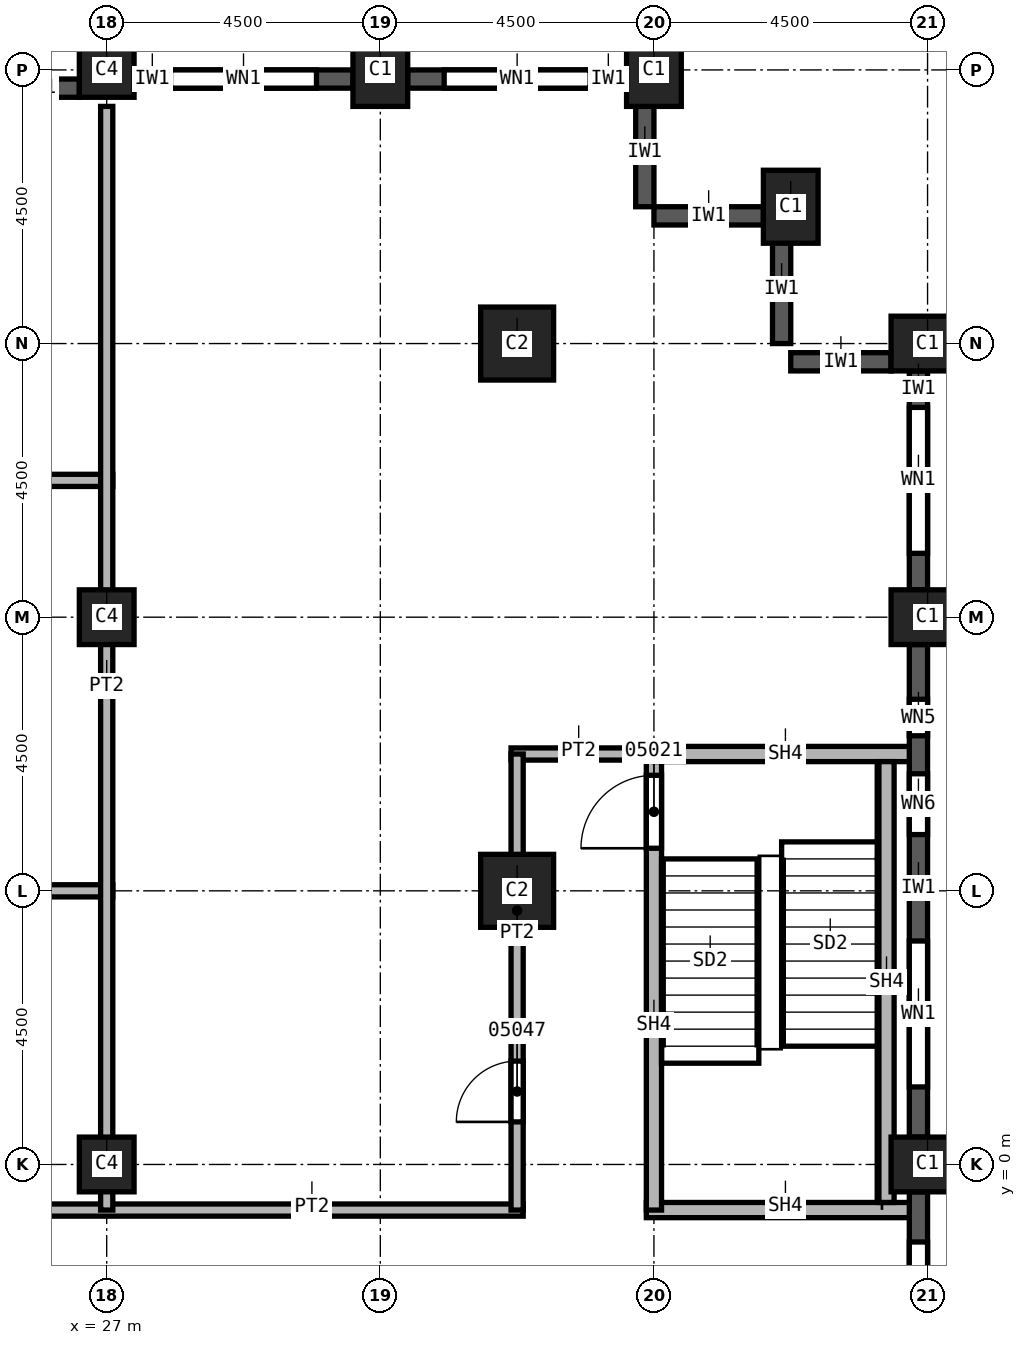
"""IFC4 building model, lengths in metres.
Left out: names, types, materials, properties, quantities, classifications, styles, units other than length and angle.
Written with IfcOpenShell. Run it as: python <this file> out.ifc"""

import sys

from ifc_helpers import new_model, si_unit, direction, frame, frame_2d, origin, origin_2d, place, context, subcontext, project, spatial, rectangle, extrude, element, fill, save


model = new_model("IFC4")
c1 = context("Model", 3, precision=1e-05, world=origin(), true_north=direction((0.0, 1.0)))
c2 = subcontext(c1, "Body", "Model", "MODEL_VIEW")
j1 = project(units=[si_unit("LENGTHUNIT", "METRE"), si_unit("PLANEANGLEUNIT", "RADIAN")], contexts=[c1])
p1 = place(None, origin())
s1 = spatial("IfcSite", under=j1, at=p1, CompositionType="ELEMENT")
p2 = place(p1, origin())
s2 = spatial("IfcBuilding", under=s1, at=p2, CompositionType="ELEMENT")
p3 = place(p2, frame((0.0, 0.0, 112.0)))
s3 = spatial("IfcBuildingStorey", under=s2, at=p3, CompositionType="ELEMENT", Elevation=112.0)
for number, where, z_axis, x_axis in (
    (1, (40.5, 0.0, 0.0), (0.0, 0.0, 1.0), (0.0, 1.0, 0.0)),
    (2, (40.5, 9.0, 0.0), (0.0, 0.0, 1.0), (0.0, 1.0, 0.0)),
    (3, (40.5, 13.5, 0.0), (0.0, 0.0, 1.0), (0.0, 1.0, 0.0)),
    (4, (38.25, 15.75, 0.0), (0.0, 0.0, 1.0), (1.0, 0.0, 0.0)),
    (5, (31.5, 18.0, 0.0), (0.0, 0.0, 1.0), (1.0, 0.0, 0.0)),
    (6, (36.0, 18.0, 0.0), (0.0, 0.0, 1.0), (1.0, 0.0, 0.0)),
):
    element("IfcColumn", number, at=place(p3, frame(where, z_axis=z_axis, x_axis=x_axis)), inside=s3, PredefinedType="COLUMN", context=c2, shape_type="SweptSolid", body=[
        extrude(rectangle(XDim=0.9, YDim=1.2, at=origin_2d()), origin(), (0.0, 0.0, 1.0), 3.7),
    ])
for number, where, z_axis, x_axis in (
    (7, (33.75, 4.5, 0.0), (0.0, 0.0, 1.0), (1.0, 0.0, 0.0)),
    (8, (33.75, 13.5, 0.0), (0.0, 0.0, 1.0), (1.0, 0.0, 0.0)),
):
    element("IfcColumn", number, at=place(p3, frame(where, z_axis=z_axis, x_axis=x_axis)), inside=s3, PredefinedType="COLUMN", context=c2, shape_type="SweptSolid", body=[
        extrude(rectangle(XDim=1.2, YDim=1.2, at=origin_2d()), origin(), (0.0, 0.0, 1.0), 3.7),
    ])
for number, where, z_axis, x_axis in (
    (9, (27.0, 0.0, 0.0), (0.0, 0.0, 1.0), (1.0, 0.0, 0.0)),
    (10, (27.0, 9.0, 0.0), (0.0, 0.0, 1.0), (1.0, 0.0, 0.0)),
    (11, (27.0, 18.0, 0.0), (0.0, 0.0, 1.0), (1.0, 0.0, 0.0)),
):
    element("IfcColumn", number, at=place(p3, frame(where, z_axis=z_axis, x_axis=x_axis)), inside=s3, PredefinedType="COLUMN", context=c2, shape_type="SweptSolid", body=[
        extrude(rectangle(XDim=0.9, YDim=0.9, at=origin_2d()), origin(), (0.0, 0.0, 1.0), 3.7),
    ])
p4 = place(p3, frame((39.9, 13.2, 0.0), z_axis=(0.0, 0.0, 1.0), x_axis=(-1.0, 0.0, 0.0)))
e12 = element("IfcWall", 12, at=p4, inside=s3, PredefinedType="SOLIDWALL", context=c2, shape_type="SweptSolid", body=[
    extrude(rectangle(XDim=1.65, YDim=0.3, at=frame_2d((0.825, 0.0))), origin(), (0.0, 0.0, 1.0), 3.1),
])
for number, where, z_axis, x_axis in (
    (13, (38.1, 15.3, 0.0), (0.0, 0.0, 1.0), (0.0, -1.0, 0.0)),
    (14, (37.8, 15.6, 0.0), (0.0, 0.0, 1.0), (-1.0, 0.0, 0.0)),
    (15, (35.85, 17.55, 0.0), (0.0, 0.0, 1.0), (0.0, -1.0, 0.0)),
):
    element("IfcWall", number, at=place(p3, frame(where, z_axis=z_axis, x_axis=x_axis)), inside=s3, PredefinedType="SOLIDWALL", context=c2, shape_type="SweptSolid", body=[
        extrude(rectangle(XDim=1.8, YDim=0.3, at=frame_2d((0.9, 0.0))), origin(), (0.0, 0.0, 1.0), 3.1),
    ])
p5 = place(p3, frame((40.35, -8.55, 0.0), z_axis=(0.0, 0.0, 1.0), x_axis=(0.0, 1.0, 0.0)))
e16 = element("IfcWall", 16, at=p5, inside=s3, PredefinedType="SOLIDWALL", context=c2, shape_type="SweptSolid", body=[
    extrude(rectangle(XDim=8.1, YDim=0.3, at=frame_2d((4.05, 0.0))), origin(), (0.0, 0.0, 1.0), 3.1),
])
p6 = place(p5, frame((0.825, 0.0, 0.8)))
e17 = element("IfcOpeningElement", 17, at=p6, cuts=e16, PredefinedType="OPENING", context=c2, shape_type="SweptSolid", body=[
    extrude(rectangle(XDim=2.4, YDim=1.95, at=frame_2d((1.2, 0.975))), frame((0.0, 0.15, 0.0), z_axis=(0.0, -1.0, 0.0), x_axis=(1.0, 0.0, 0.0)), (0.0, 0.0, 1.0), 0.3),
])
p7 = place(p5, frame((4.875, 0.0, 0.8)))
e18 = element("IfcOpeningElement", 18, at=p7, cuts=e16, PredefinedType="OPENING", context=c2, shape_type="SweptSolid", body=[
    extrude(rectangle(XDim=2.4, YDim=1.95, at=frame_2d((1.2, 0.975))), frame((0.0, 0.15, 0.0), z_axis=(0.0, -1.0, 0.0), x_axis=(1.0, 0.0, 0.0)), (0.0, 0.0, 1.0), 0.3),
])
p8 = place(p3, frame((40.35, 0.45, 0.0), z_axis=(0.0, 0.0, 1.0), x_axis=(0.0, 1.0, 0.0)))
e19 = element("IfcWall", 19, at=p8, inside=s3, PredefinedType="SOLIDWALL", context=c2, shape_type="SweptSolid", body=[
    extrude(rectangle(XDim=8.1, YDim=0.3, at=frame_2d((4.05, 0.0))), origin(), (0.0, 0.0, 1.0), 3.1),
])
p9 = place(p8, frame((0.825, 0.0, 0.8)))
e20 = element("IfcOpeningElement", 20, at=p9, cuts=e19, PredefinedType="OPENING", context=c2, shape_type="SweptSolid", body=[
    extrude(rectangle(XDim=2.4, YDim=1.95, at=frame_2d((1.2, 0.975))), frame((0.0, 0.15, 0.0), z_axis=(0.0, -1.0, 0.0), x_axis=(1.0, 0.0, 0.0)), (0.0, 0.0, 1.0), 0.3),
])
p10 = place(p8, frame((4.975, 0.0, 0.8)))
e21 = element("IfcOpeningElement", 21, at=p10, cuts=e19, PredefinedType="OPENING", context=c2, shape_type="SweptSolid", body=[
    extrude(rectangle(XDim=1.0, YDim=1.95, at=frame_2d((0.5, 0.975))), frame((0.0, 0.15, 0.0), z_axis=(0.0, -1.0, 0.0), x_axis=(1.0, 0.0, 0.0)), (0.0, 0.0, 1.0), 0.3),
])
p11 = place(p8, frame((6.6, 0.0, 0.8)))
e22 = element("IfcOpeningElement", 22, at=p11, cuts=e19, PredefinedType="OPENING", context=c2, shape_type="SweptSolid", body=[
    extrude(rectangle(XDim=0.6, YDim=1.95, at=frame_2d((0.3, 0.975))), frame((0.0, 0.15, 0.0), z_axis=(0.0, -1.0, 0.0), x_axis=(1.0, 0.0, 0.0)), (0.0, 0.0, 1.0), 0.3),
])
p12 = place(p3, frame((40.35, 9.45, 0.0), z_axis=(0.0, 0.0, 1.0), x_axis=(0.0, 1.0, 0.0)))
e23 = element("IfcWall", 23, at=p12, inside=s3, PredefinedType="SOLIDWALL", context=c2, shape_type="SweptSolid", body=[
    extrude(rectangle(XDim=3.6, YDim=0.3, at=frame_2d((1.8, 0.0))), origin(), (0.0, 0.0, 1.0), 3.1),
])
p13 = place(p12, frame((0.6, 0.0, 0.8)))
e24 = element("IfcOpeningElement", 24, at=p13, cuts=e23, PredefinedType="OPENING", context=c2, shape_type="SweptSolid", body=[
    extrude(rectangle(XDim=2.4, YDim=1.95, at=frame_2d((1.2, 0.975))), frame((0.0, 0.15, 0.0), z_axis=(0.0, -1.0, 0.0), x_axis=(1.0, 0.0, 0.0)), (0.0, 0.0, 1.0), 0.3),
])
p14 = place(p3, frame((35.55, 17.85, 0.0), z_axis=(0.0, 0.0, 1.0), x_axis=(-1.0, 0.0, 0.0)))
e25 = element("IfcWall", 25, at=p14, inside=s3, PredefinedType="SOLIDWALL", context=c2, shape_type="SweptSolid", body=[
    extrude(rectangle(XDim=3.6, YDim=0.3, at=frame_2d((1.8, 0.0))), origin(), (0.0, 0.0, 1.0), 3.1),
])
p15 = place(p14, frame((0.6, 0.0, 0.8)))
e26 = element("IfcOpeningElement", 26, at=p15, cuts=e25, PredefinedType="OPENING", context=c2, shape_type="SweptSolid", body=[
    extrude(rectangle(XDim=2.4, YDim=1.95, at=frame_2d((1.2, 0.975))), frame((0.0, 0.15, 0.0), z_axis=(0.0, -1.0, 0.0), x_axis=(1.0, 0.0, 0.0)), (0.0, 0.0, 1.0), 0.3),
])
p16 = place(p3, frame((31.05, 17.85, 0.0), z_axis=(0.0, 0.0, 1.0), x_axis=(-1.0, 0.0, 0.0)))
e27 = element("IfcWall", 27, at=p16, inside=s3, PredefinedType="SOLIDWALL", context=c2, shape_type="SweptSolid", body=[
    extrude(rectangle(XDim=3.6, YDim=0.3, at=frame_2d((1.8, 0.0))), origin(), (0.0, 0.0, 1.0), 3.1),
])
p17 = place(p16, frame((0.6, 0.0, 0.8)))
e28 = element("IfcOpeningElement", 28, at=p17, cuts=e27, PredefinedType="OPENING", context=c2, shape_type="SweptSolid", body=[
    extrude(rectangle(XDim=2.4, YDim=1.95, at=frame_2d((1.2, 0.975))), frame((0.0, 0.15, 0.0), z_axis=(0.0, -1.0, 0.0), x_axis=(1.0, 0.0, 0.0)), (0.0, 0.0, 1.0), 0.3),
])
p18 = place(p3, frame((26.55, 17.7, 0.0), z_axis=(0.0, 0.0, 1.0), x_axis=(-1.0, 0.0, 0.0)))
e29 = element("IfcWall", 29, at=p18, inside=s3, PredefinedType="SOLIDWALL", context=c2, shape_type="SweptSolid", body=[
    extrude(rectangle(XDim=1.35, YDim=0.3, at=frame_2d((0.675, 0.0))), origin(), (0.0, 0.0, 1.0), 3.1),
])
p19 = place(p3, frame((19.9, -0.75, 0.0), z_axis=(0.0, 0.0, 1.0), x_axis=(1.0, 0.0, 0.0)))
e30 = element("IfcWall", 30, at=p19, inside=s3, PredefinedType="PARTITIONING", context=c2, shape_type="SweptSolid", body=[
    extrude(rectangle(XDim=13.95, YDim=0.2, at=frame_2d((6.975, 0.0))), origin(), (0.0, 0.0, 1.0), 3.7),
])
p20 = place(p19, frame((3.4, 0.0, 0.0)))
e31 = element("IfcOpeningElement", 31, at=p20, cuts=e30, PredefinedType="OPENING", context=c2, shape_type="SweptSolid", body=[
    extrude(rectangle(XDim=1.0, YDim=2.1, at=frame_2d((0.5, 1.05))), frame((0.0, 0.1, 0.0), z_axis=(0.0, -1.0, 0.0), x_axis=(1.0, 0.0, 0.0)), (0.0, 0.0, 1.0), 0.2),
])
for number, where, z_axis, x_axis in (
    (32, (19.9, 4.5, 0.0), (0.0, 0.0, 1.0), (1.0, 0.0, 0.0)),
    (33, (19.9, 11.25, 0.0), (0.0, 0.0, 1.0), (1.0, 0.0, 0.0)),
):
    element("IfcWall", number, at=place(p3, frame(where, z_axis=z_axis, x_axis=x_axis)), inside=s3, PredefinedType="PARTITIONING", context=c2, shape_type="SweptSolid", body=[
        extrude(rectangle(XDim=7.2, YDim=0.2, at=frame_2d((3.6, 0.0))), origin(), (0.0, 0.0, 1.0), 3.7),
    ])
p21 = place(p3, frame((27.0, 17.4, 0.0), z_axis=(0.0, 0.0, 1.0), x_axis=(0.0, -1.0, 0.0)))
e34 = element("IfcWall", 34, at=p21, inside=s3, PredefinedType="PARTITIONING", context=c2, shape_type="SweptSolid", body=[
    extrude(rectangle(XDim=18.15, YDim=0.2, at=frame_2d((9.075, 0.0))), origin(), (0.0, 0.0, 1.0), 3.7),
])
p22 = place(p3, frame((33.65, 6.75, 0.0), z_axis=(0.0, 0.0, 1.0), x_axis=(1.0, 0.0, 0.0)))
e35 = element("IfcWall", 35, at=p22, inside=s3, PredefinedType="PARTITIONING", context=c2, shape_type="SweptSolid", body=[
    extrude(rectangle(XDim=2.35, YDim=0.2, at=frame_2d((1.175, 0.0))), origin(), (0.0, 0.0, 1.0), 3.7),
])
p23 = place(p3, frame((33.75, -0.75, 0.0), z_axis=(0.0, 0.0, 1.0), x_axis=(0.0, 1.0, 0.0)))
e36 = element("IfcWall", 36, at=p23, inside=s3, PredefinedType="PARTITIONING", context=c2, shape_type="SweptSolid", body=[
    extrude(rectangle(XDim=7.5, YDim=0.2, at=frame_2d((3.75, 0.0))), origin(), (0.0, 0.0, 1.0), 3.7),
])
p24 = place(p23, frame((1.45, 0.0, 0.0)))
e37 = element("IfcOpeningElement", 37, at=p24, cuts=e36, PredefinedType="OPENING", context=c2, shape_type="SweptSolid", body=[
    extrude(rectangle(XDim=1.0, YDim=2.1, at=frame_2d((0.5, 1.05))), frame((0.0, 0.1, 0.0), z_axis=(0.0, -1.0, 0.0), x_axis=(1.0, 0.0, 0.0)), (0.0, 0.0, 1.0), 0.2),
])
p25 = place(p3, frame((35.875, -0.75, 0.0), z_axis=(0.0, 0.0, 1.0), x_axis=(1.0, 0.0, 0.0)))
e38 = element("IfcWall", 38, at=p25, inside=s3, PredefinedType="SOLIDWALL", context=c2, shape_type="SweptSolid", body=[
    extrude(rectangle(XDim=4.325, YDim=0.25, at=frame_2d((2.163, 0.0))), origin(), (0.0, 0.0, 1.0), 3.7),
])
p26 = place(p3, frame((36.0, -0.75, 0.0), z_axis=(0.0, 0.0, 1.0), x_axis=(0.0, 1.0, 0.0)))
e39 = element("IfcWall", 39, at=p26, inside=s3, PredefinedType="SOLIDWALL", context=c2, shape_type="SweptSolid", body=[
    extrude(rectangle(XDim=7.625, YDim=0.25, at=frame_2d((3.812, 0.0))), origin(), (0.0, 0.0, 1.0), 3.7),
])
p27 = place(p26, frame((5.95, 0.0, 0.0)))
e40 = element("IfcOpeningElement", 40, at=p27, cuts=e39, PredefinedType="OPENING", context=c2, shape_type="SweptSolid", body=[
    extrude(rectangle(XDim=1.2, YDim=2.1, at=frame_2d((0.6, 1.05))), frame((0.0, 0.125, 0.0), z_axis=(0.0, -1.0, 0.0), x_axis=(1.0, 0.0, 0.0)), (0.0, 0.0, 1.0), 0.25),
])
p28 = place(p3, frame((36.0, 6.75, 0.0), z_axis=(0.0, 0.0, 1.0), x_axis=(1.0, 0.0, 0.0)))
e41 = element("IfcWall", 41, at=p28, inside=s3, PredefinedType="SOLIDWALL", context=c2, shape_type="SweptSolid", body=[
    extrude(rectangle(XDim=4.2, YDim=0.25, at=frame_2d((2.1, 0.0))), origin(), (0.0, 0.0, 1.0), 3.7),
])
p29 = place(p3, frame((39.825, -0.625, 0.0), z_axis=(0.0, 0.0, 1.0), x_axis=(0.0, 1.0, 0.0)))
e42 = element("IfcWall", 42, at=p29, inside=s3, PredefinedType="SOLIDWALL", context=c2, shape_type="SweptSolid", body=[
    extrude(rectangle(XDim=7.25, YDim=0.25, at=frame_2d((3.625, 0.0))), origin(), (0.0, 0.0, 1.0), 3.7),
])
p30 = place(p7, origin())
e43 = element("IfcWindow", 43, at=p30, inside=s3, PartitioningType="SINGLE_PANEL", PredefinedType="WINDOW", context=c2, shape_type="SweptSolid", body=[
    extrude(rectangle(XDim=2.4, YDim=1.95, at=frame_2d((1.2, 0.975))), frame((0.0, 0.03, 0.0), z_axis=(0.0, -1.0, 0.0), x_axis=(1.0, 0.0, 0.0)), (0.0, 0.0, 1.0), 0.06),
])
fill(e18, e43)
p31 = place(p9, origin())
e44 = element("IfcWindow", 44, at=p31, inside=s3, PartitioningType="SINGLE_PANEL", PredefinedType="WINDOW", context=c2, shape_type="SweptSolid", body=[
    extrude(rectangle(XDim=2.4, YDim=1.95, at=frame_2d((1.2, 0.975))), frame((0.0, 0.03, 0.0), z_axis=(0.0, -1.0, 0.0), x_axis=(1.0, 0.0, 0.0)), (0.0, 0.0, 1.0), 0.06),
])
fill(e20, e44)
p32 = place(p13, origin())
e45 = element("IfcWindow", 45, at=p32, inside=s3, PartitioningType="SINGLE_PANEL", PredefinedType="WINDOW", context=c2, shape_type="SweptSolid", body=[
    extrude(rectangle(XDim=2.4, YDim=1.95, at=frame_2d((1.2, 0.975))), frame((0.0, 0.03, 0.0), z_axis=(0.0, -1.0, 0.0), x_axis=(1.0, 0.0, 0.0)), (0.0, 0.0, 1.0), 0.06),
])
fill(e24, e45)
p33 = place(p15, origin())
e46 = element("IfcWindow", 46, at=p33, inside=s3, PartitioningType="SINGLE_PANEL", PredefinedType="WINDOW", context=c2, shape_type="SweptSolid", body=[
    extrude(rectangle(XDim=2.4, YDim=1.95, at=frame_2d((1.2, 0.975))), frame((0.0, 0.03, 0.0), z_axis=(0.0, -1.0, 0.0), x_axis=(1.0, 0.0, 0.0)), (0.0, 0.0, 1.0), 0.06),
])
fill(e26, e46)
p34 = place(p17, origin())
e47 = element("IfcWindow", 47, at=p34, inside=s3, PartitioningType="SINGLE_PANEL", PredefinedType="WINDOW", context=c2, shape_type="SweptSolid", body=[
    extrude(rectangle(XDim=2.4, YDim=1.95, at=frame_2d((1.2, 0.975))), frame((0.0, 0.03, 0.0), z_axis=(0.0, -1.0, 0.0), x_axis=(1.0, 0.0, 0.0)), (0.0, 0.0, 1.0), 0.06),
])
fill(e28, e47)
p35 = place(p27, origin())
e48 = element("IfcDoor", 48, at=p35, inside=s3, OperationType="SINGLE_SWING_RIGHT", PredefinedType="DOOR", context=c2, shape_type="SweptSolid", body=[
    extrude(rectangle(XDim=1.2, YDim=2.1, at=frame_2d((0.6, 1.05))), frame((0.0, 0.025, 0.0), z_axis=(0.0, -1.0, 0.0), x_axis=(1.0, 0.0, 0.0)), (0.0, 0.0, 1.0), 0.05),
])
fill(e40, e48)
p36 = place(p24, origin())
e49 = element("IfcDoor", 49, at=p36, inside=s3, OperationType="SINGLE_SWING_RIGHT", PredefinedType="DOOR", context=c2, shape_type="SweptSolid", body=[
    extrude(rectangle(XDim=1.0, YDim=2.1, at=frame_2d((0.5, 1.05))), frame((0.0, 0.025, 0.0), z_axis=(0.0, -1.0, 0.0), x_axis=(1.0, 0.0, 0.0)), (0.0, 0.0, 1.0), 0.05),
])
fill(e37, e49)
p37 = place(p10, origin())
e50 = element("IfcWindow", 50, at=p37, inside=s3, PartitioningType="SINGLE_PANEL", PredefinedType="WINDOW", context=c2, shape_type="SweptSolid", body=[
    extrude(rectangle(XDim=1.0, YDim=1.95, at=frame_2d((0.5, 0.975))), frame((0.0, 0.03, 0.0), z_axis=(0.0, -1.0, 0.0), x_axis=(1.0, 0.0, 0.0)), (0.0, 0.0, 1.0), 0.06),
])
fill(e21, e50)
p38 = place(p11, origin())
e51 = element("IfcWindow", 51, at=p38, inside=s3, PartitioningType="SINGLE_PANEL", PredefinedType="WINDOW", context=c2, shape_type="SweptSolid", body=[
    extrude(rectangle(XDim=0.6, YDim=1.95, at=frame_2d((0.3, 0.975))), frame((0.0, 0.03, 0.0), z_axis=(0.0, -1.0, 0.0), x_axis=(1.0, 0.0, 0.0)), (0.0, 0.0, 1.0), 0.06),
])
fill(e22, e51)
save(model, sys.argv[1])
